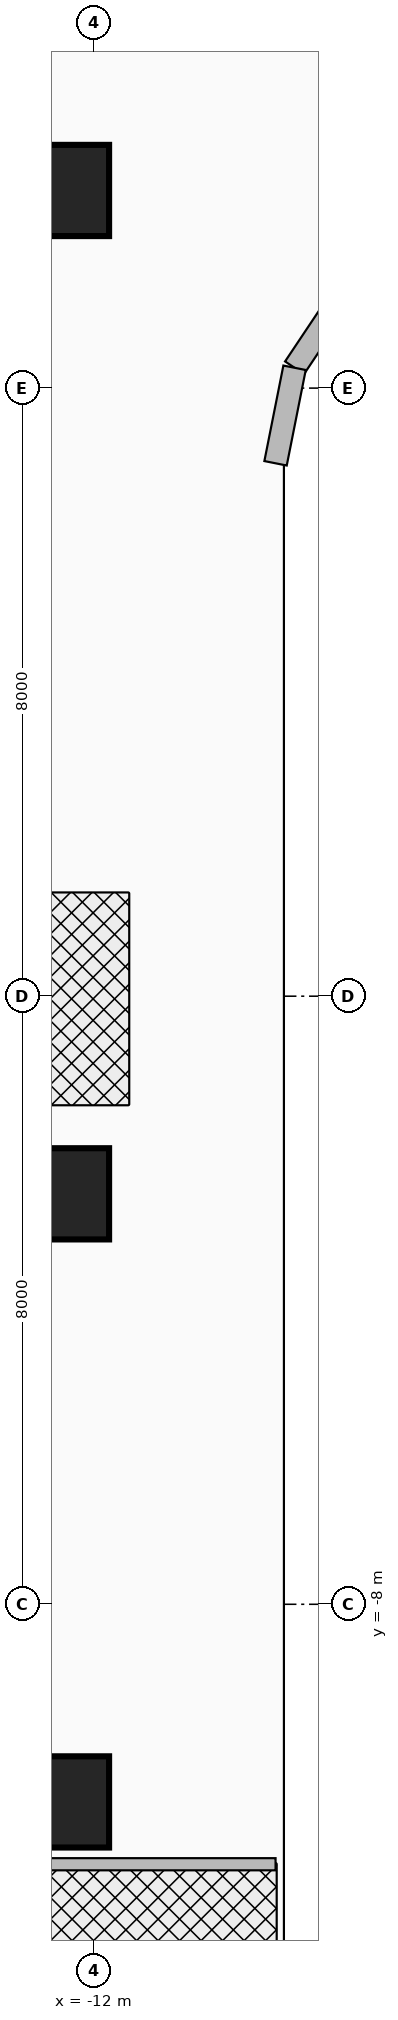
"""IFC4 building model, lengths in metres.
Left out: names, types, materials, properties, quantities, classifications, styles, units other than length and angle.
Written with IfcOpenShell. Run it as: python <this file> out.ifc"""

import sys

from ifc_helpers import new_model, si_unit, direction, frame, frame_2d, origin, origin_2d, place, context, subcontext, project, spatial, rectangle, extrude, source, transform, mapped, element, save


model = new_model("IFC4")
c1 = context("Model", 3, precision=1e-05, world=origin(), true_north=direction((0.0, 1.0)))
c2 = subcontext(c1, "Body", "Model", "MODEL_VIEW")
j1 = project(units=[si_unit("LENGTHUNIT", "METRE"), si_unit("PLANEANGLEUNIT", "RADIAN")], contexts=[c1])
p1 = place(None, origin())
s1 = spatial("IfcSite", under=j1, at=p1, CompositionType="ELEMENT")
p2 = place(p1, origin())
s2 = spatial("IfcBuilding", under=s1, at=p2, CompositionType="ELEMENT")
p3 = place(p2, frame((0.0, 0.0, 131.6)))
s3 = spatial("IfcBuildingStorey", under=s2, at=p3, CompositionType="ELEMENT", Elevation=131.6)
for number, where, z_axis, x_axis in (
    (1, (-22.65, 10.8, 0.0), (0.0, 0.0, 1.0), (1.0, 0.0, 0.0)),
    (2, (-22.65, -10.8, 0.0), (0.0, 0.0, 1.0), (1.0, 0.0, 0.0)),
):
    element("IfcWall", number, at=place(p3, frame(where, z_axis=z_axis, x_axis=x_axis)), inside=s3, PredefinedType="SHEAR", context=c2, shape_type="SweptSolid", body=[
        extrude(rectangle(XDim=10.25, YDim=0.7, at=frame_2d((5.125, 0.0))), origin(), (0.0, 0.0, 1.0), 3.46),
    ])
m1 = source(origin(), c2, "Body", "SweptSolid", [
    extrude(rectangle(XDim=1.2, YDim=1.2, at=origin_2d()), origin(), (0.0, 0.0, 1.0), 3.7),
])
for number, where, z_axis, x_axis in (
    (3, (-12.4, -10.6, 0.0), (0.0, 0.0, 1.0), (1.0, 0.0, 0.0)),
    (4, (-12.4, -2.6, 0.0), (0.0, 0.0, 1.0), (1.0, 0.0, 0.0)),
    (5, (-12.4, 10.6, 0.0), (0.0, 0.0, 1.0), (1.0, 0.0, 0.0)),
):
    element("IfcColumn", number, at=place(p3, frame(where, z_axis=z_axis, x_axis=x_axis)), inside=s3, PredefinedType="COLUMN", context=c2, shape_type="MappedRepresentation", body=[
        mapped(m1, transform((0.0, 0.0, 0.0), x_axis=(1.0, 0.0, 0.0), y_axis=(0.0, 1.0, 0.0), z_axis=(0.0, 0.0, 1.0), scale=1.0)),
    ])
p4 = place(p3, frame((-8.642, 9.342, 0.0), z_axis=(0.0, 0.0, 1.0), x_axis=(-0.555615398575, -0.831439431869, 0.0)))
e6 = element("IfcWall", 6, at=p4, inside=s3, PredefinedType="SOLIDWALL", context=c2, shape_type="SweptSolid", body=[
    extrude(rectangle(XDim=1.292, YDim=0.3, at=frame_2d((0.646, 0.0))), origin(), (0.0, 0.0, 1.0), 3.46),
])
p5 = place(p3, frame((-9.36, 8.268, 0.0), z_axis=(0.0, 0.0, 1.0), x_axis=(-0.195090163074, -0.980785312019, 0.0)))
e7 = element("IfcWall", 7, at=p5, inside=s3, PredefinedType="SOLIDWALL", context=c2, shape_type="SweptSolid", body=[
    extrude(rectangle(XDim=1.281, YDim=0.3, at=frame_2d((0.641, 0.0))), origin(), (0.0, 0.0, 1.0), 3.46),
])
p6 = place(p3, frame((-23.45, -11.42, 0.0), z_axis=(0.0, 0.0, 1.0), x_axis=(1.0, 0.0, 0.0)))
e8 = element("IfcWall", 8, at=p6, inside=s3, PredefinedType="PARTITIONING", context=c2, shape_type="SweptSolid", body=[
    extrude(rectangle(XDim=13.84, YDim=0.16, at=frame_2d((6.92, 0.0))), origin(), (0.0, 0.0, 1.0), 2.834),
])
save(model, sys.argv[1])
